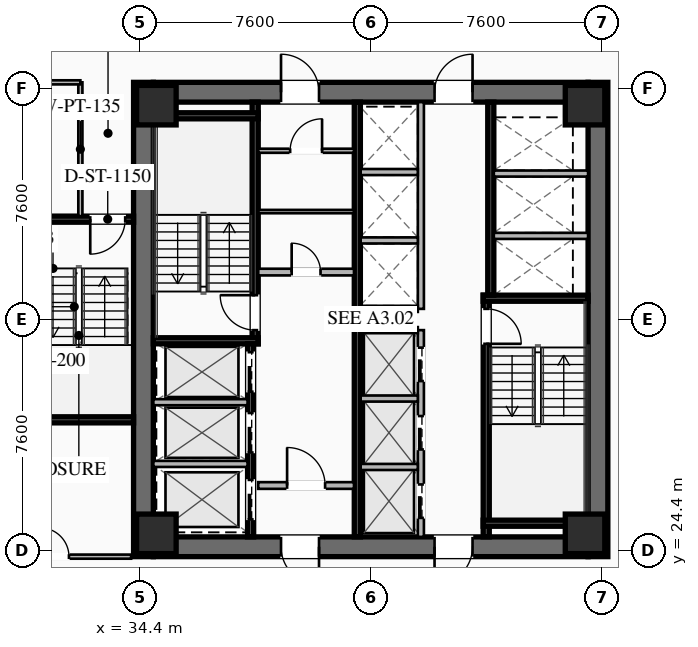
"""IFC4 building model, lengths in metres.
Left out: names, types, materials, properties, quantities, classifications, styles, units other than length and angle.
Written with IfcOpenShell. Run it as: python <this file> out.ifc"""

import sys

from ifc_helpers import new_model, si_unit, direction, frame, frame_2d, origin, origin_2d, place, context, subcontext, project, spatial, rectangle, hollow_rectangle, extrude, element, fill, save


model = new_model("IFC4")
c1 = context("Model", 3, precision=1e-05, world=origin(), true_north=direction((0.0, 1.0)))
c2 = subcontext(c1, "Body", "Model", "MODEL_VIEW")
j1 = project(units=[si_unit("LENGTHUNIT", "METRE"), si_unit("PLANEANGLEUNIT", "RADIAN")], contexts=[c1])
p1 = place(None, origin())
s1 = spatial("IfcSite", under=j1, at=p1, CompositionType="ELEMENT")
p2 = place(p1, origin())
s2 = spatial("IfcBuilding", under=s1, at=p2, CompositionType="ELEMENT")
p3 = place(p2, frame((0.0, 0.0, 28.15)))
s3 = spatial("IfcBuildingStorey", under=s2, at=p3, CompositionType="ELEMENT", Elevation=28.15)
for number, where, z_axis, x_axis in (
    (1, (34.525, 24.2, 0.0), (0.0, 0.0, 1.0), (0.0, 1.0, 0.0)),
    (2, (49.475, 39.8, 0.0), (0.0, 0.0, 1.0), (0.0, -1.0, 0.0)),
):
    element("IfcWall", number, at=place(p3, frame(where, z_axis=z_axis, x_axis=x_axis)), inside=s3, PredefinedType="SHEAR", context=c2, shape_type="SweptSolid", body=[
        extrude(rectangle(XDim=15.6, YDim=0.65, at=frame_2d((7.8, 0.0))), origin(), (0.0, 0.0, 1.0), 3.55),
    ])
p4 = place(p3, frame((49.15, 24.525, 0.0), z_axis=(0.0, 0.0, 1.0), x_axis=(-1.0, 0.0, 0.0)))
e3 = element("IfcWall", 3, at=p4, inside=s3, PredefinedType="SHEAR", context=c2, shape_type="SweptSolid", body=[
    extrude(rectangle(XDim=14.3, YDim=0.65, at=frame_2d((7.15, 0.0))), origin(), (0.0, 0.0, 1.0), 3.55),
])
p5 = place(p4, frame((8.85, 0.0, 0.0)))
e4 = element("IfcOpeningElement", 4, at=p5, cuts=e3, PredefinedType="OPENING", context=c2, shape_type="SweptSolid", body=[
    extrude(rectangle(XDim=1.25, YDim=2.25, at=frame_2d((0.625, 1.125))), frame((0.0, 0.335, 0.0), z_axis=(0.0, -1.0, 0.0), x_axis=(1.0, 0.0, 0.0)), (0.0, 0.0, 1.0), 0.67),
])
p6 = place(p4, frame((3.8, 0.0, 0.0)))
e5 = element("IfcOpeningElement", 5, at=p6, cuts=e3, PredefinedType="OPENING", context=c2, shape_type="SweptSolid", body=[
    extrude(rectangle(XDim=1.25, YDim=2.25, at=frame_2d((0.625, 1.125))), frame((0.0, 0.335, 0.0), z_axis=(0.0, -1.0, 0.0), x_axis=(1.0, 0.0, 0.0)), (0.0, 0.0, 1.0), 0.67),
])
p7 = place(p3, frame((34.85, 39.475, 0.0), z_axis=(0.0, 0.0, 1.0), x_axis=(1.0, 0.0, 0.0)))
e6 = element("IfcWall", 6, at=p7, inside=s3, PredefinedType="SHEAR", context=c2, shape_type="SweptSolid", body=[
    extrude(rectangle(XDim=14.3, YDim=0.65, at=frame_2d((7.15, 0.0))), origin(), (0.0, 0.0, 1.0), 3.55),
])
p8 = place(p7, frame((4.2, 0.0, 0.0)))
e7 = element("IfcOpeningElement", 7, at=p8, cuts=e6, PredefinedType="OPENING", context=c2, shape_type="SweptSolid", body=[
    extrude(rectangle(XDim=1.25, YDim=2.25, at=frame_2d((0.625, 1.125))), frame((0.0, 0.335, 0.0), z_axis=(0.0, -1.0, 0.0), x_axis=(1.0, 0.0, 0.0)), (0.0, 0.0, 1.0), 0.67),
])
p9 = place(p7, frame((9.25, 0.0, 0.0)))
e8 = element("IfcOpeningElement", 8, at=p9, cuts=e6, PredefinedType="OPENING", context=c2, shape_type="SweptSolid", body=[
    extrude(rectangle(XDim=1.25, YDim=2.25, at=frame_2d((0.625, 1.125))), frame((0.0, 0.335, 0.0), z_axis=(0.0, -1.0, 0.0), x_axis=(1.0, 0.0, 0.0)), (0.0, 0.0, 1.0), 0.67),
])
for number, where, z_axis, x_axis in (
    (9, (34.95, 24.95, 0.0), (0.0, 0.0, 1.0), (1.0, 0.0, 0.0)),
    (10, (49.05, 24.95, 0.0), (0.0, 0.0, 1.0), (1.0, 0.0, 0.0)),
    (11, (49.05, 39.05, 0.0), (0.0, 0.0, 1.0), (1.0, 0.0, 0.0)),
    (12, (34.95, 39.05, 0.0), (0.0, 0.0, 1.0), (1.0, 0.0, 0.0)),
):
    element("IfcColumn", number, at=place(p3, frame(where, z_axis=z_axis, x_axis=x_axis)), inside=s3, PredefinedType="COLUMN", context=c2, shape_type="SweptSolid", body=[
        extrude(hollow_rectangle(XDim=1.3, YDim=1.3, WallThickness=0.05, at=origin_2d()), origin(), (0.0, 0.0, 1.0), 3.35),
    ])
p10 = place(p3, frame((38.2, 31.2, 0.0), z_axis=(0.0, 0.0, 1.0), x_axis=(0.0, 1.0, 0.0)))
e13 = element("IfcWall", 13, at=p10, inside=s3, PredefinedType="SHEAR", context=c2, shape_type="SweptSolid", body=[
    extrude(rectangle(XDim=7.95, YDim=0.2, at=frame_2d((3.975, 0.0))), origin(), (0.0, 0.0, 1.0), 3.35),
])
p11 = place(p10, frame((0.45, 0.0, 0.0)))
e14 = element("IfcOpeningElement", 14, at=p11, cuts=e13, PredefinedType="OPENING", context=c2, shape_type="SweptSolid", body=[
    extrude(rectangle(XDim=1.15, YDim=2.2, at=frame_2d((0.575, 1.1))), frame((0.0, 0.11, 0.0), z_axis=(0.0, -1.0, 0.0), x_axis=(1.0, 0.0, 0.0)), (0.0, 0.0, 1.0), 0.22),
])
for number, where, z_axis, x_axis in (
    (15, (34.85, 31.3, 0.0), (0.0, 0.0, 1.0), (1.0, 0.0, 0.0)),
    (16, (34.85, 38.7, 0.0), (0.0, 0.0, 1.0), (1.0, 0.0, 0.0)),
):
    element("IfcWall", number, at=place(p3, frame(where, z_axis=z_axis, x_axis=x_axis)), inside=s3, PredefinedType="SHEAR", context=c2, shape_type="SweptSolid", body=[
        extrude(rectangle(XDim=3.45, YDim=0.2, at=frame_2d((1.725, 0.0))), origin(), (0.0, 0.0, 1.0), 3.35),
    ])
p12 = place(p3, frame((45.8, 32.8, 0.0), z_axis=(0.0, 0.0, 1.0), x_axis=(0.0, -1.0, 0.0)))
e17 = element("IfcWall", 17, at=p12, inside=s3, PredefinedType="SHEAR", context=c2, shape_type="SweptSolid", body=[
    extrude(rectangle(XDim=7.95, YDim=0.2, at=frame_2d((3.975, 0.0))), origin(), (0.0, 0.0, 1.0), 3.35),
])
p13 = place(p12, frame((0.45, 0.0, 0.0)))
e18 = element("IfcOpeningElement", 18, at=p13, cuts=e17, PredefinedType="OPENING", context=c2, shape_type="SweptSolid", body=[
    extrude(rectangle(XDim=1.15, YDim=2.2, at=frame_2d((0.575, 1.1))), frame((0.0, 0.11, 0.0), z_axis=(0.0, -1.0, 0.0), x_axis=(1.0, 0.0, 0.0)), (0.0, 0.0, 1.0), 0.22),
])
for number, where, z_axis, x_axis in (
    (19, (45.7, 32.7, 0.0), (0.0, 0.0, 1.0), (1.0, 0.0, 0.0)),
    (20, (45.7, 25.3, 0.0), (0.0, 0.0, 1.0), (1.0, 0.0, 0.0)),
):
    element("IfcWall", number, at=place(p3, frame(where, z_axis=z_axis, x_axis=x_axis)), inside=s3, PredefinedType="SHEAR", context=c2, shape_type="SweptSolid", body=[
        extrude(rectangle(XDim=3.45, YDim=0.2, at=frame_2d((1.725, 0.0))), origin(), (0.0, 0.0, 1.0), 3.35),
    ])
p14 = place(p3, frame((41.56, 24.85, 0.0), z_axis=(0.0, 0.0, 1.0), x_axis=(0.0, 1.0, 0.0)))
e21 = element("IfcWall", 21, at=p14, inside=s3, PredefinedType="SHEAR", context=c2, shape_type="SweptSolid", body=[
    extrude(rectangle(XDim=14.3, YDim=0.2, at=frame_2d((7.15, 0.0))), origin(), (0.0, 0.0, 1.0), 3.35),
])
p15 = place(p3, frame((38.3, 33.56, 0.0), z_axis=(0.0, 0.0, 1.0), x_axis=(1.0, 0.0, 0.0)))
e22 = element("IfcWall", 22, at=p15, inside=s3, PredefinedType="SOLIDWALL", context=c2, shape_type="SweptSolid", body=[
    extrude(rectangle(XDim=3.15, YDim=0.22, at=frame_2d((1.575, 0.0))), origin(), (0.0, 0.0, 1.0), 2.703),
])
p16 = place(p15, frame((1.1, 0.0, 0.0)))
e23 = element("IfcOpeningElement", 23, at=p16, cuts=e22, PredefinedType="OPENING", context=c2, shape_type="SweptSolid", body=[
    extrude(rectangle(XDim=0.95, YDim=2.05, at=frame_2d((0.475, 1.025))), frame((0.0, 0.12, 0.0), z_axis=(0.0, -1.0, 0.0), x_axis=(1.0, 0.0, 0.0)), (0.0, 0.0, 1.0), 0.24),
])
p17 = place(p3, frame((38.3, 26.54, 0.0), z_axis=(0.0, 0.0, 1.0), x_axis=(1.0, 0.0, 0.0)))
e24 = element("IfcWall", 24, at=p17, inside=s3, PredefinedType="SOLIDWALL", context=c2, shape_type="SweptSolid", body=[
    extrude(rectangle(XDim=3.15, YDim=0.22, at=frame_2d((1.575, 0.0))), origin(), (0.0, 0.0, 1.0), 2.703),
])
p18 = place(p17, frame((0.95, 0.0, 0.0)))
e25 = element("IfcOpeningElement", 25, at=p18, cuts=e24, PredefinedType="OPENING", context=c2, shape_type="SweptSolid", body=[
    extrude(rectangle(XDim=1.25, YDim=2.25, at=frame_2d((0.625, 1.125))), frame((0.0, 0.12, 0.0), z_axis=(0.0, -1.0, 0.0), x_axis=(1.0, 0.0, 0.0)), (0.0, 0.0, 1.0), 0.24),
])
p19 = place(p3, frame((38.05, 24.85, 0.0), z_axis=(0.0, 0.0, 1.0), x_axis=(0.0, 1.0, 0.0)))
e26 = element("IfcWall", 26, at=p19, inside=s3, PredefinedType="SHEAR", context=c2, shape_type="SweptSolid", body=[
    extrude(rectangle(XDim=6.35, YDim=0.2, at=frame_2d((3.175, 0.0))), origin(), (0.0, 0.0, 1.0), 3.35),
])
p20 = place(p19, frame((4.775, 0.0, 0.0)))
e27 = element("IfcOpeningElement", 27, at=p20, cuts=e26, PredefinedType="OPENING", context=c2, shape_type="SweptSolid", body=[
    extrude(rectangle(XDim=1.3, YDim=2.25, at=frame_2d((0.65, 1.125))), frame((0.0, 0.11, 0.0), z_axis=(0.0, -1.0, 0.0), x_axis=(1.0, 0.0, 0.0)), (0.0, 0.0, 1.0), 0.22),
])
p21 = place(p19, frame((2.775, 0.0, 0.0)))
e28 = element("IfcOpeningElement", 28, at=p21, cuts=e26, PredefinedType="OPENING", context=c2, shape_type="SweptSolid", body=[
    extrude(rectangle(XDim=1.3, YDim=2.25, at=frame_2d((0.65, 1.125))), frame((0.0, 0.11, 0.0), z_axis=(0.0, -1.0, 0.0), x_axis=(1.0, 0.0, 0.0)), (0.0, 0.0, 1.0), 0.22),
])
p22 = place(p19, frame((0.575, 0.0, 0.0)))
e29 = element("IfcOpeningElement", 29, at=p22, cuts=e26, PredefinedType="OPENING", context=c2, shape_type="SweptSolid", body=[
    extrude(rectangle(XDim=1.3, YDim=2.25, at=frame_2d((0.65, 1.125))), frame((0.0, 0.11, 0.0), z_axis=(0.0, -1.0, 0.0), x_axis=(1.0, 0.0, 0.0)), (0.0, 0.0, 1.0), 0.22),
])
for number, where, z_axis, x_axis in (
    (30, (34.85, 27.25, 0.0), (0.0, 0.0, 1.0), (1.0, 0.0, 0.0)),
    (31, (34.85, 29.28, 0.0), (0.0, 0.0, 1.0), (1.0, 0.0, 0.0)),
):
    element("IfcWall", number, at=place(p3, frame(where, z_axis=z_axis, x_axis=x_axis)), inside=s3, PredefinedType="SOLIDWALL", context=c2, shape_type="SweptSolid", body=[
        extrude(rectangle(XDim=3.1, YDim=0.2, at=frame_2d((1.55, 0.0))), origin(), (0.0, 0.0, 1.0), 3.35),
    ])
p23 = place(p3, frame((45.95, 39.15, 0.0), z_axis=(0.0, 0.0, 1.0), x_axis=(0.0, -1.0, 0.0)))
e32 = element("IfcWall", 32, at=p23, inside=s3, PredefinedType="SHEAR", context=c2, shape_type="SweptSolid", body=[
    extrude(rectangle(XDim=6.35, YDim=0.2, at=frame_2d((3.175, 0.0))), origin(), (0.0, 0.0, 1.0), 3.35),
])
for number, where, z_axis, x_axis in (
    (33, (46.05, 34.75, 0.0), (0.0, 0.0, 1.0), (1.0, 0.0, 0.0)),
    (34, (46.05, 36.8, 0.0), (0.0, 0.0, 1.0), (1.0, 0.0, 0.0)),
):
    element("IfcWall", number, at=place(p3, frame(where, z_axis=z_axis, x_axis=x_axis)), inside=s3, PredefinedType="SOLIDWALL", context=c2, shape_type="SweptSolid", body=[
        extrude(rectangle(XDim=3.1, YDim=0.2, at=frame_2d((1.55, 0.0))), origin(), (0.0, 0.0, 1.0), 3.35),
    ])
p24 = place(p3, frame((38.3, 37.55, 0.0), z_axis=(0.0, 0.0, 1.0), x_axis=(1.0, 0.0, 0.0)))
e35 = element("IfcWall", 35, at=p24, inside=s3, PredefinedType="PARTITIONING", context=c2, shape_type="SweptSolid", body=[
    extrude(rectangle(XDim=3.15, YDim=0.135, at=frame_2d((1.575, 0.0))), origin(), (0.0, 0.0, 1.0), 2.703),
])
p25 = place(p24, frame((1.05, 0.0, 0.0)))
e36 = element("IfcOpeningElement", 36, at=p25, cuts=e35, PredefinedType="OPENING", context=c2, shape_type="SweptSolid", body=[
    extrude(rectangle(XDim=1.05, YDim=2.2, at=frame_2d((0.525, 1.1))), frame((0.0, 0.077, 0.0), z_axis=(0.0, -1.0, 0.0), x_axis=(1.0, 0.0, 0.0)), (0.0, 0.0, 1.0), 0.155),
])
p26 = place(p3, frame((38.3, 35.55, 0.0), z_axis=(0.0, 0.0, 1.0), x_axis=(1.0, 0.0, 0.0)))
e37 = element("IfcWall", 37, at=p26, inside=s3, PredefinedType="PARTITIONING", context=c2, shape_type="SweptSolid", body=[
    extrude(rectangle(XDim=3.15, YDim=0.11, at=frame_2d((1.575, 0.0))), origin(), (0.0, 0.0, 1.0), 2.703),
])
p27 = place(p3, frame((43.65, 24.85, 0.0), z_axis=(0.0, 0.0, 1.0), x_axis=(0.0, 1.0, 0.0)))
e38 = element("IfcWall", 38, at=p27, inside=s3, PredefinedType="SOLIDWALL", context=c2, shape_type="SweptSolid", body=[
    extrude(rectangle(XDim=6.8, YDim=0.2, at=frame_2d((3.4, 0.0))), origin(), (0.0, 0.0, 1.0), 3.35),
])
p28 = place(p27, frame((0.625, 0.0, 0.0)))
e39 = element("IfcOpeningElement", 39, at=p28, cuts=e38, PredefinedType="OPENING", context=c2, shape_type="SweptSolid", body=[
    extrude(rectangle(XDim=1.1, YDim=2.2, at=frame_2d((0.55, 1.1))), frame((0.0, 0.11, 0.0), z_axis=(0.0, -1.0, 0.0), x_axis=(1.0, 0.0, 0.0)), (0.0, 0.0, 1.0), 0.22),
])
p29 = place(p27, frame((2.875, 0.0, 0.0)))
e40 = element("IfcOpeningElement", 40, at=p29, cuts=e38, PredefinedType="OPENING", context=c2, shape_type="SweptSolid", body=[
    extrude(rectangle(XDim=1.1, YDim=2.2, at=frame_2d((0.55, 1.1))), frame((0.0, 0.11, 0.0), z_axis=(0.0, -1.0, 0.0), x_axis=(1.0, 0.0, 0.0)), (0.0, 0.0, 1.0), 0.22),
])
p30 = place(p27, frame((5.125, 0.0, 0.0)))
e41 = element("IfcOpeningElement", 41, at=p30, cuts=e38, PredefinedType="OPENING", context=c2, shape_type="SweptSolid", body=[
    extrude(rectangle(XDim=1.1, YDim=2.2, at=frame_2d((0.55, 1.1))), frame((0.0, 0.11, 0.0), z_axis=(0.0, -1.0, 0.0), x_axis=(1.0, 0.0, 0.0)), (0.0, 0.0, 1.0), 0.22),
])
for number, where, z_axis, x_axis in (
    (42, (41.67, 27.15, 0.0), (0.0, 0.0, 1.0), (1.0, 0.0, 0.0)),
    (43, (41.67, 29.4, 0.0), (0.0, 0.0, 1.0), (1.0, 0.0, 0.0)),
    (44, (41.67, 31.65, 0.0), (0.0, 0.0, 1.0), (1.0, 0.0, 0.0)),
):
    element("IfcWall", number, at=place(p3, frame(where, z_axis=z_axis, x_axis=x_axis)), inside=s3, PredefinedType="SOLIDWALL", context=c2, shape_type="SweptSolid", body=[
        extrude(rectangle(XDim=1.88, YDim=0.2, at=frame_2d((0.94, 0.0))), origin(), (0.0, 0.0, 1.0), 3.35),
    ])
p31 = place(p3, frame((43.65, 32.35, 0.0), z_axis=(0.0, 0.0, 1.0), x_axis=(0.0, 1.0, 0.0)))
e45 = element("IfcWall", 45, at=p31, inside=s3, PredefinedType="SOLIDWALL", context=c2, shape_type="SweptSolid", body=[
    extrude(rectangle(XDim=6.8, YDim=0.2, at=frame_2d((3.4, 0.0))), origin(), (0.0, 0.0, 1.0), 3.35),
])
for number, where, z_axis, x_axis in (
    (46, (41.67, 32.35, 0.0), (0.0, 0.0, 1.0), (1.0, 0.0, 0.0)),
    (47, (41.67, 34.6, 0.0), (0.0, 0.0, 1.0), (1.0, 0.0, 0.0)),
    (48, (41.67, 36.85, 0.0), (0.0, 0.0, 1.0), (1.0, 0.0, 0.0)),
):
    element("IfcWall", number, at=place(p3, frame(where, z_axis=z_axis, x_axis=x_axis)), inside=s3, PredefinedType="SOLIDWALL", context=c2, shape_type="SweptSolid", body=[
        extrude(rectangle(XDim=1.88, YDim=0.2, at=frame_2d((0.94, 0.0))), origin(), (0.0, 0.0, 1.0), 3.35),
    ])
p32 = place(p3, frame((34.2, 35.3, 0.0), z_axis=(0.0, 0.0, 1.0), x_axis=(-1.0, 0.0, 0.0)))
e49 = element("IfcWall", 49, at=p32, inside=s3, PredefinedType="SHEAR", context=c2, shape_type="SweptSolid", body=[
    extrude(rectangle(XDim=3.4, YDim=0.2, at=frame_2d((1.7, 0.0))), origin(), (0.0, 0.0, 1.0), 3.35),
])
p33 = place(p32, frame((0.275, 0.0, 0.0)))
e50 = element("IfcOpeningElement", 50, at=p33, cuts=e49, PredefinedType="OPENING", context=c2, shape_type="SweptSolid", body=[
    extrude(rectangle(XDim=1.15, YDim=2.2, at=frame_2d((0.575, 1.1))), frame((0.0, 0.11, 0.0), z_axis=(0.0, -1.0, 0.0), x_axis=(1.0, 0.0, 0.0)), (0.0, 0.0, 1.0), 0.22),
])
p34 = place(p3, frame((30.8, 28.7, 0.0), z_axis=(0.0, 0.0, 1.0), x_axis=(1.0, 0.0, 0.0)))
e51 = element("IfcWall", 51, at=p34, inside=s3, PredefinedType="SHEAR", context=c2, shape_type="SweptSolid", body=[
    extrude(rectangle(XDim=3.4, YDim=0.2, at=frame_2d((1.7, 0.0))), origin(), (0.0, 0.0, 1.0), 3.35),
])
p35 = place(p3, frame((32.45, 35.4, 0.0), z_axis=(0.0, 0.0, 1.0), x_axis=(0.0, 1.0, 0.0)))
e52 = element("IfcWall", 52, at=p35, inside=s3, PredefinedType="PARTITIONING", context=c2, shape_type="SweptSolid", body=[
    extrude(rectangle(XDim=4.4, YDim=0.135, at=frame_2d((2.2, 0.0))), origin(), (0.0, 0.0, 1.0), 2.703),
])
p36 = place(p3, frame((32.45, 39.8, 0.0), z_axis=(0.0, 0.0, 1.0), x_axis=(-1.0, 0.0, 0.0)))
e53 = element("IfcWall", 53, at=p36, inside=s3, PredefinedType="PARTITIONING", context=c2, shape_type="SweptSolid", body=[
    extrude(rectangle(XDim=13.33, YDim=0.135, at=frame_2d((6.665, 0.0))), origin(), (0.0, 0.0, 1.0), 2.703),
])
p37 = place(p36, frame((5.84, 0.0, 0.0)))
e54 = element("IfcOpeningElement", 54, at=p37, cuts=e53, PredefinedType="OPENING", context=c2, shape_type="SweptSolid", body=[
    extrude(rectangle(XDim=0.95, YDim=2.05, at=frame_2d((0.475, 1.025))), frame((0.0, 0.077, 0.0), z_axis=(0.0, -1.0, 0.0), x_axis=(1.0, 0.0, 0.0)), (0.0, 0.0, 1.0), 0.155),
])
p38 = place(p3, frame((19.12, 24.2, 0.0), z_axis=(0.0, 0.0, 1.0), x_axis=(1.0, 0.0, 0.0)))
e55 = element("IfcWall", 55, at=p38, inside=s3, PredefinedType="PARTITIONING", context=c2, shape_type="SweptSolid", body=[
    extrude(rectangle(XDim=15.0, YDim=0.135, at=frame_2d((7.5, 0.0))), origin(), (0.0, 0.0, 1.0), 2.703),
])
p39 = place(p38, frame((12.005, 0.0, 0.0)))
e56 = element("IfcOpeningElement", 56, at=p39, cuts=e55, PredefinedType="OPENING", context=c2, shape_type="SweptSolid", body=[
    extrude(rectangle(XDim=0.95, YDim=2.05, at=frame_2d((0.475, 1.025))), frame((0.0, 0.077, 0.0), z_axis=(0.0, -1.0, 0.0), x_axis=(1.0, 0.0, 0.0)), (0.0, 0.0, 1.0), 0.155),
])
p40 = place(p8, origin())
e57 = element("IfcDoor", 57, at=p40, inside=s3, OperationType="SINGLE_SWING_LEFT", PredefinedType="DOOR", context=c2, shape_type="SweptSolid", body=[
    extrude(rectangle(XDim=1.25, YDim=2.25, at=frame_2d((0.625, 1.125))), frame((0.0, 0.025, 0.0), z_axis=(0.0, -1.0, 0.0), x_axis=(1.0, 0.0, 0.0)), (0.0, 0.0, 1.0), 0.05),
])
fill(e7, e57)
p41 = place(p9, origin())
e58 = element("IfcDoor", 58, at=p41, inside=s3, OperationType="SINGLE_SWING_RIGHT", PredefinedType="DOOR", context=c2, shape_type="SweptSolid", body=[
    extrude(rectangle(XDim=1.25, YDim=2.25, at=frame_2d((0.625, 1.125))), frame((0.0, 0.025, 0.0), z_axis=(0.0, -1.0, 0.0), x_axis=(1.0, 0.0, 0.0)), (0.0, 0.0, 1.0), 0.05),
])
fill(e8, e58)
p42 = place(p5, origin())
e59 = element("IfcDoor", 59, at=p42, inside=s3, OperationType="SINGLE_SWING_LEFT", PredefinedType="DOOR", context=c2, shape_type="SweptSolid", body=[
    extrude(rectangle(XDim=1.25, YDim=2.25, at=frame_2d((0.625, 1.125))), frame((0.0, 0.025, 0.0), z_axis=(0.0, -1.0, 0.0), x_axis=(1.0, 0.0, 0.0)), (0.0, 0.0, 1.0), 0.05),
])
fill(e4, e59)
p43 = place(p6, origin())
e60 = element("IfcDoor", 60, at=p43, inside=s3, OperationType="SINGLE_SWING_RIGHT", PredefinedType="DOOR", context=c2, shape_type="SweptSolid", body=[
    extrude(rectangle(XDim=1.25, YDim=2.25, at=frame_2d((0.625, 1.125))), frame((0.0, 0.025, 0.0), z_axis=(0.0, -1.0, 0.0), x_axis=(1.0, 0.0, 0.0)), (0.0, 0.0, 1.0), 0.05),
])
fill(e5, e60)
p44 = place(p11, origin())
e61 = element("IfcDoor", 61, at=p44, inside=s3, OperationType="SINGLE_SWING_RIGHT", PredefinedType="DOOR", context=c2, shape_type="SweptSolid", body=[
    extrude(rectangle(XDim=1.15, YDim=2.2, at=frame_2d((0.575, 1.1))), frame((0.0, 0.025, 0.0), z_axis=(0.0, -1.0, 0.0), x_axis=(1.0, 0.0, 0.0)), (0.0, 0.0, 1.0), 0.05),
])
fill(e14, e61)
p45 = place(p13, origin())
e62 = element("IfcDoor", 62, at=p45, inside=s3, OperationType="SINGLE_SWING_RIGHT", PredefinedType="DOOR", context=c2, shape_type="SweptSolid", body=[
    extrude(rectangle(XDim=1.15, YDim=2.2, at=frame_2d((0.575, 1.1))), frame((0.0, 0.025, 0.0), z_axis=(0.0, -1.0, 0.0), x_axis=(1.0, 0.0, 0.0)), (0.0, 0.0, 1.0), 0.05),
])
fill(e18, e62)
p46 = place(p18, origin())
e63 = element("IfcDoor", 63, at=p46, inside=s3, OperationType="SINGLE_SWING_LEFT", PredefinedType="DOOR", context=c2, shape_type="SweptSolid", body=[
    extrude(rectangle(XDim=1.25, YDim=2.25, at=frame_2d((0.625, 1.125))), frame((0.0, 0.025, 0.0), z_axis=(0.0, -1.0, 0.0), x_axis=(1.0, 0.0, 0.0)), (0.0, 0.0, 1.0), 0.05),
])
fill(e25, e63)
p47 = place(p25, origin())
e64 = element("IfcDoor", 64, at=p47, inside=s3, OperationType="SINGLE_SWING_RIGHT", PredefinedType="DOOR", context=c2, shape_type="SweptSolid", body=[
    extrude(rectangle(XDim=1.05, YDim=2.2, at=frame_2d((0.525, 1.1))), frame((0.0, 0.025, 0.0), z_axis=(0.0, -1.0, 0.0), x_axis=(1.0, 0.0, 0.0)), (0.0, 0.0, 1.0), 0.05),
])
fill(e36, e64)
p48 = place(p16, origin())
e65 = element("IfcDoor", 65, at=p48, inside=s3, OperationType="SINGLE_SWING_LEFT", PredefinedType="DOOR", context=c2, shape_type="SweptSolid", body=[
    extrude(rectangle(XDim=0.95, YDim=2.05, at=frame_2d((0.475, 1.025))), frame((0.0, 0.025, 0.0), z_axis=(0.0, -1.0, 0.0), x_axis=(1.0, 0.0, 0.0)), (0.0, 0.0, 1.0), 0.05),
])
fill(e23, e65)
p49 = place(p33, origin())
e66 = element("IfcDoor", 66, at=p49, inside=s3, OperationType="SINGLE_SWING_RIGHT", PredefinedType="DOOR", context=c2, shape_type="SweptSolid", body=[
    extrude(rectangle(XDim=1.15, YDim=2.2, at=frame_2d((0.575, 1.1))), frame((0.0, 0.025, 0.0), z_axis=(0.0, -1.0, 0.0), x_axis=(1.0, 0.0, 0.0)), (0.0, 0.0, 1.0), 0.05),
])
fill(e50, e66)
p50 = place(p39, origin())
e67 = element("IfcDoor", 67, at=p50, inside=s3, OperationType="SINGLE_SWING_LEFT", PredefinedType="DOOR", context=c2, shape_type="SweptSolid", body=[
    extrude(rectangle(XDim=0.95, YDim=2.05, at=frame_2d((0.475, 1.025))), frame((0.0, 0.025, 0.0), z_axis=(0.0, -1.0, 0.0), x_axis=(1.0, 0.0, 0.0)), (0.0, 0.0, 1.0), 0.05),
])
fill(e56, e67)
p51 = place(p20, origin())
e68 = element("IfcDoor", 68, at=p51, inside=s3, OperationType="SLIDING_TO_LEFT", PredefinedType="DOOR", context=c2, shape_type="SweptSolid", body=[
    extrude(rectangle(XDim=1.3, YDim=2.25, at=frame_2d((0.65, 1.125))), frame((0.0, 0.025, 0.0), z_axis=(0.0, -1.0, 0.0), x_axis=(1.0, 0.0, 0.0)), (0.0, 0.0, 1.0), 0.05),
])
fill(e27, e68)
p52 = place(p21, origin())
e69 = element("IfcDoor", 69, at=p52, inside=s3, OperationType="SLIDING_TO_LEFT", PredefinedType="DOOR", context=c2, shape_type="SweptSolid", body=[
    extrude(rectangle(XDim=1.3, YDim=2.25, at=frame_2d((0.65, 1.125))), frame((0.0, 0.025, 0.0), z_axis=(0.0, -1.0, 0.0), x_axis=(1.0, 0.0, 0.0)), (0.0, 0.0, 1.0), 0.05),
])
fill(e28, e69)
p53 = place(p22, origin())
e70 = element("IfcDoor", 70, at=p53, inside=s3, OperationType="SLIDING_TO_LEFT", PredefinedType="DOOR", context=c2, shape_type="SweptSolid", body=[
    extrude(rectangle(XDim=1.3, YDim=2.25, at=frame_2d((0.65, 1.125))), frame((0.0, 0.025, 0.0), z_axis=(0.0, -1.0, 0.0), x_axis=(1.0, 0.0, 0.0)), (0.0, 0.0, 1.0), 0.05),
])
fill(e29, e70)
p54 = place(p28, origin())
e71 = element("IfcDoor", 71, at=p54, inside=s3, OperationType="SLIDING_TO_LEFT", PredefinedType="DOOR", context=c2, shape_type="SweptSolid", body=[
    extrude(rectangle(XDim=1.1, YDim=2.2, at=frame_2d((0.55, 1.1))), frame((0.0, 0.025, 0.0), z_axis=(0.0, -1.0, 0.0), x_axis=(1.0, 0.0, 0.0)), (0.0, 0.0, 1.0), 0.05),
])
fill(e39, e71)
p55 = place(p29, origin())
e72 = element("IfcDoor", 72, at=p55, inside=s3, OperationType="SLIDING_TO_LEFT", PredefinedType="DOOR", context=c2, shape_type="SweptSolid", body=[
    extrude(rectangle(XDim=1.1, YDim=2.2, at=frame_2d((0.55, 1.1))), frame((0.0, 0.025, 0.0), z_axis=(0.0, -1.0, 0.0), x_axis=(1.0, 0.0, 0.0)), (0.0, 0.0, 1.0), 0.05),
])
fill(e40, e72)
p56 = place(p30, origin())
e73 = element("IfcDoor", 73, at=p56, inside=s3, OperationType="SLIDING_TO_LEFT", PredefinedType="DOOR", context=c2, shape_type="SweptSolid", body=[
    extrude(rectangle(XDim=1.1, YDim=2.2, at=frame_2d((0.55, 1.1))), frame((0.0, 0.025, 0.0), z_axis=(0.0, -1.0, 0.0), x_axis=(1.0, 0.0, 0.0)), (0.0, 0.0, 1.0), 0.05),
])
fill(e41, e73)
save(model, sys.argv[1])
